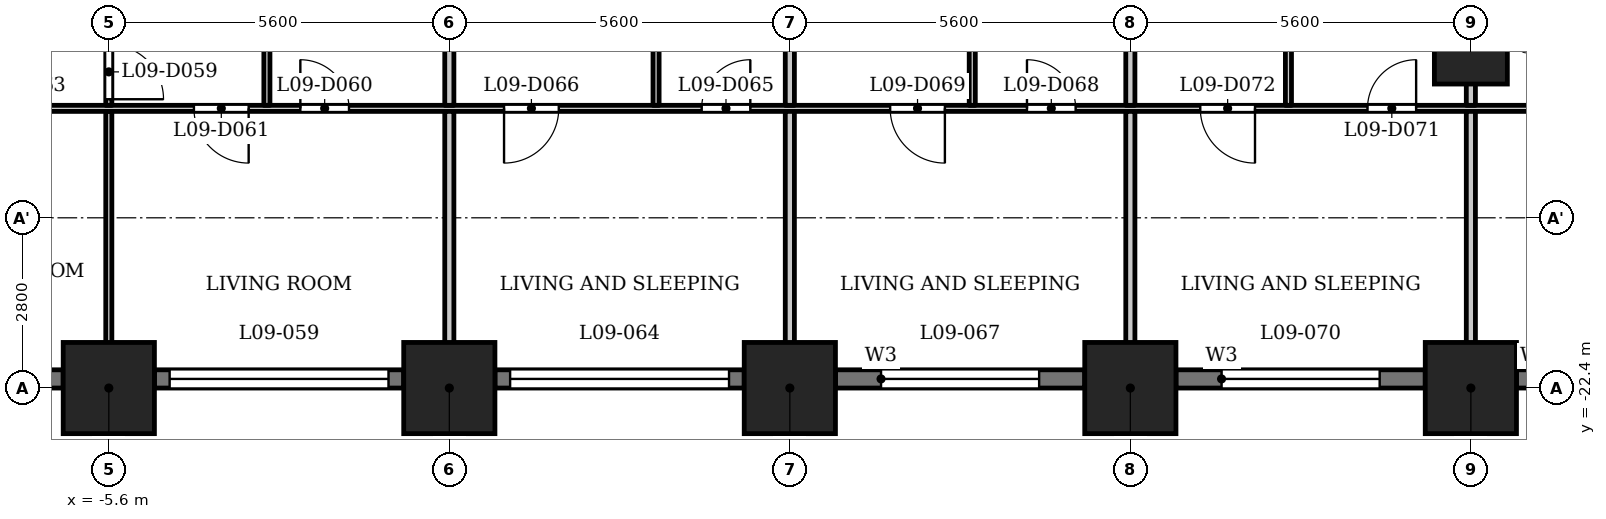
"""IFC4 building model, lengths in metres.
Left out: names, types, materials, properties, quantities, classifications, styles, units other than length and angle.
Written with IfcOpenShell. Run it as: python <this file> out.ifc"""

import sys

from ifc_helpers import new_model, si_unit, direction, frame, frame_2d, origin, origin_2d, place, context, subcontext, project, spatial, rectangle, extrude, element, fill, save


model = new_model("IFC4")
c1 = context("Model", 3, precision=1e-05, world=origin(), true_north=direction((0.0, 1.0)))
c2 = subcontext(c1, "Body", "Model", "MODEL_VIEW")
j1 = project(units=[si_unit("LENGTHUNIT", "METRE"), si_unit("PLANEANGLEUNIT", "RADIAN")], contexts=[c1])
p1 = place(None, origin())
s1 = spatial("IfcSite", under=j1, at=p1, CompositionType="ELEMENT")
p2 = place(p1, origin())
s2 = spatial("IfcBuilding", under=s1, at=p2, CompositionType="ELEMENT")
p3 = place(p2, frame((0.0, 0.0, 41.0)))
s3 = spatial("IfcBuildingStorey", under=s2, at=p3, CompositionType="ELEMENT", Elevation=41.0)
for number, where, z_axis, x_axis in (
    (1, (-5.6, -22.4, 0.0), (0.0, 0.0, 1.0), (1.0, 0.0, 0.0)),
    (2, (0.0, -22.4, 0.0), (0.0, 0.0, 1.0), (1.0, 0.0, 0.0)),
    (3, (5.6, -22.4, 0.0), (0.0, 0.0, 1.0), (1.0, 0.0, 0.0)),
    (4, (11.2, -22.4, 0.0), (0.0, 0.0, 1.0), (1.0, 0.0, 0.0)),
    (5, (16.8, -22.4, 0.0), (0.0, 0.0, 1.0), (1.0, 0.0, 0.0)),
):
    element("IfcColumn", number, at=place(p3, frame(where, z_axis=z_axis, x_axis=x_axis)), inside=s3, PredefinedType="COLUMN", context=c2, shape_type="SweptSolid", body=[
        extrude(rectangle(XDim=1.5, YDim=1.5, at=origin_2d()), origin(), (0.0, 0.0, 1.0), 3.5),
    ])
p4 = place(p3, frame((16.8, -16.8, 0.0), z_axis=(0.0, 0.0, 1.0), x_axis=(1.0, 0.0, 0.0)))
e6 = element("IfcColumn", 6, at=p4, inside=s3, PredefinedType="COLUMN", context=c2, shape_type="SweptSolid", body=[
    extrude(rectangle(XDim=1.2, YDim=1.2, at=origin_2d()), origin(), (0.0, 0.0, 1.0), 3.5),
])
p5 = place(p3, frame((-10.45, -22.25, 0.0), z_axis=(0.0, 0.0, 1.0), x_axis=(1.0, 0.0, 0.0)))
e7 = element("IfcWall", 7, at=p5, inside=s3, PredefinedType="SOLIDWALL", context=c2, shape_type="SweptSolid", body=[
    extrude(rectangle(XDim=4.1, YDim=0.3, at=frame_2d((2.05, 0.0))), origin(), (0.0, 0.0, 1.0), 2.35),
])
p6 = place(p5, frame((0.488, 0.0, 0.6)))
e8 = element("IfcOpeningElement", 8, at=p6, cuts=e7, PredefinedType="OPENING", context=c2, shape_type="SweptSolid", body=[
    extrude(rectangle(XDim=1.2, YDim=1.55, at=frame_2d((0.6, 0.775))), frame((0.0, 0.16, 0.0), z_axis=(0.0, -1.0, 0.0), x_axis=(1.0, 0.0, 0.0)), (0.0, 0.0, 1.0), 0.32),
])
p7 = place(p5, frame((2.613, 0.0, 0.6)))
e9 = element("IfcOpeningElement", 9, at=p7, cuts=e7, PredefinedType="OPENING", context=c2, shape_type="SweptSolid", body=[
    extrude(rectangle(XDim=1.2, YDim=1.55, at=frame_2d((0.6, 0.775))), frame((0.0, 0.16, 0.0), z_axis=(0.0, -1.0, 0.0), x_axis=(1.0, 0.0, 0.0)), (0.0, 0.0, 1.0), 0.32),
])
p8 = place(p3, frame((-4.85, -22.25, 0.0), z_axis=(0.0, 0.0, 1.0), x_axis=(1.0, 0.0, 0.0)))
e10 = element("IfcWall", 10, at=p8, inside=s3, PredefinedType="SOLIDWALL", context=c2, shape_type="SweptSolid", body=[
    extrude(rectangle(XDim=4.1, YDim=0.3, at=frame_2d((2.05, 0.0))), origin(), (0.0, 0.0, 1.0), 2.35),
])
p9 = place(p8, frame((0.25, 0.0, 1.2)))
e11 = element("IfcOpeningElement", 11, at=p9, cuts=e10, PredefinedType="OPENING", context=c2, shape_type="SweptSolid", body=[
    extrude(rectangle(XDim=3.6, YDim=0.95, at=frame_2d((1.8, 0.475))), frame((0.0, 0.16, 0.0), z_axis=(0.0, -1.0, 0.0), x_axis=(1.0, 0.0, 0.0)), (0.0, 0.0, 1.0), 0.32),
])
p10 = place(p3, frame((0.75, -22.25, 0.0), z_axis=(0.0, 0.0, 1.0), x_axis=(1.0, 0.0, 0.0)))
e12 = element("IfcWall", 12, at=p10, inside=s3, PredefinedType="SOLIDWALL", context=c2, shape_type="SweptSolid", body=[
    extrude(rectangle(XDim=4.1, YDim=0.3, at=frame_2d((2.05, 0.0))), origin(), (0.0, 0.0, 1.0), 2.35),
])
p11 = place(p10, frame((0.25, 0.0, 1.2)))
e13 = element("IfcOpeningElement", 13, at=p11, cuts=e12, PredefinedType="OPENING", context=c2, shape_type="SweptSolid", body=[
    extrude(rectangle(XDim=3.6, YDim=0.95, at=frame_2d((1.8, 0.475))), frame((0.0, 0.16, 0.0), z_axis=(0.0, -1.0, 0.0), x_axis=(1.0, 0.0, 0.0)), (0.0, 0.0, 1.0), 0.32),
])
p12 = place(p3, frame((6.35, -22.25, 0.0), z_axis=(0.0, 0.0, 1.0), x_axis=(1.0, 0.0, 0.0)))
e14 = element("IfcWall", 14, at=p12, inside=s3, PredefinedType="SOLIDWALL", context=c2, shape_type="SweptSolid", body=[
    extrude(rectangle(XDim=4.1, YDim=0.3, at=frame_2d((2.05, 0.0))), origin(), (0.0, 0.0, 1.0), 2.35),
])
p13 = place(p12, frame((0.75, 0.0, 0.9)))
e15 = element("IfcOpeningElement", 15, at=p13, cuts=e14, PredefinedType="OPENING", context=c2, shape_type="SweptSolid", body=[
    extrude(rectangle(XDim=2.6, YDim=1.25, at=frame_2d((1.3, 0.625))), frame((0.0, 0.16, 0.0), z_axis=(0.0, -1.0, 0.0), x_axis=(1.0, 0.0, 0.0)), (0.0, 0.0, 1.0), 0.32),
])
p14 = place(p3, frame((11.95, -22.25, 0.0), z_axis=(0.0, 0.0, 1.0), x_axis=(1.0, 0.0, 0.0)))
e16 = element("IfcWall", 16, at=p14, inside=s3, PredefinedType="SOLIDWALL", context=c2, shape_type="SweptSolid", body=[
    extrude(rectangle(XDim=4.1, YDim=0.3, at=frame_2d((2.05, 0.0))), origin(), (0.0, 0.0, 1.0), 2.35),
])
p15 = place(p14, frame((0.75, 0.0, 0.9)))
e17 = element("IfcOpeningElement", 17, at=p15, cuts=e16, PredefinedType="OPENING", context=c2, shape_type="SweptSolid", body=[
    extrude(rectangle(XDim=2.6, YDim=1.25, at=frame_2d((1.3, 0.625))), frame((0.0, 0.16, 0.0), z_axis=(0.0, -1.0, 0.0), x_axis=(1.0, 0.0, 0.0)), (0.0, 0.0, 1.0), 0.32),
])
p16 = place(p3, frame((17.55, -22.25, 0.0), z_axis=(0.0, 0.0, 1.0), x_axis=(1.0, 0.0, 0.0)))
e18 = element("IfcWall", 18, at=p16, inside=s3, PredefinedType="SOLIDWALL", context=c2, shape_type="SweptSolid", body=[
    extrude(rectangle(XDim=2.45, YDim=0.3, at=frame_2d((1.225, 0.0))), origin(), (0.0, 0.0, 1.0), 2.35),
])
p17 = place(p16, frame((0.325, 0.0, 0.9)))
e19 = element("IfcOpeningElement", 19, at=p17, cuts=e18, PredefinedType="OPENING", context=c2, shape_type="SweptSolid", body=[
    extrude(rectangle(XDim=1.8, YDim=1.25, at=frame_2d((0.9, 0.625))), frame((0.0, 0.16, 0.0), z_axis=(0.0, -1.0, 0.0), x_axis=(1.0, 0.0, 0.0)), (0.0, 0.0, 1.0), 0.32),
])
p18 = place(p3, frame((-26.394, -17.8, 0.0), z_axis=(0.0, 0.0, 1.0), x_axis=(1.0, 0.0, 0.0)))
e20 = element("IfcWall", 20, at=p18, inside=s3, PredefinedType="PARTITIONING", context=c2, shape_type="SweptSolid", body=[
    extrude(rectangle(XDim=53.126, YDim=0.1, at=frame_2d((26.563, 0.0))), origin(), (0.0, 0.0, 1.0), 3.2),
])
p19 = place(p18, frame((0.794, 0.0, 0.0)))
e21 = element("IfcOpeningElement", 21, at=p19, cuts=e20, PredefinedType="OPENING", context=c2, shape_type="SweptSolid", body=[
    extrude(rectangle(XDim=0.8, YDim=2.1, at=frame_2d((0.4, 1.05))), frame((0.0, 0.06, 0.0), z_axis=(0.0, -1.0, 0.0), x_axis=(1.0, 0.0, 0.0)), (0.0, 0.0, 1.0), 0.12),
])
p20 = place(p18, frame((5.644, 0.0, 0.0)))
e22 = element("IfcOpeningElement", 22, at=p20, cuts=e20, PredefinedType="OPENING", context=c2, shape_type="SweptSolid", body=[
    extrude(rectangle(XDim=0.9, YDim=2.1, at=frame_2d((0.45, 1.05))), frame((0.0, 0.06, 0.0), z_axis=(0.0, -1.0, 0.0), x_axis=(1.0, 0.0, 0.0)), (0.0, 0.0, 1.0), 0.12),
])
p21 = place(p18, frame((10.394, 0.0, 0.0)))
e23 = element("IfcOpeningElement", 23, at=p21, cuts=e20, PredefinedType="OPENING", context=c2, shape_type="SweptSolid", body=[
    extrude(rectangle(XDim=0.8, YDim=2.1, at=frame_2d((0.4, 1.05))), frame((0.0, 0.06, 0.0), z_axis=(0.0, -1.0, 0.0), x_axis=(1.0, 0.0, 0.0)), (0.0, 0.0, 1.0), 0.12),
])
p22 = place(p18, frame((13.244, 0.0, 0.0)))
e24 = element("IfcOpeningElement", 24, at=p22, cuts=e20, PredefinedType="OPENING", context=c2, shape_type="SweptSolid", body=[
    extrude(rectangle(XDim=0.9, YDim=2.1, at=frame_2d((0.45, 1.05))), frame((0.0, 0.06, 0.0), z_axis=(0.0, -1.0, 0.0), x_axis=(1.0, 0.0, 0.0)), (0.0, 0.0, 1.0), 0.12),
])
p23 = place(p18, frame((23.944, 0.0, 0.0)))
e25 = element("IfcOpeningElement", 25, at=p23, cuts=e20, PredefinedType="OPENING", context=c2, shape_type="SweptSolid", body=[
    extrude(rectangle(XDim=0.8, YDim=2.1, at=frame_2d((0.4, 1.05))), frame((0.0, 0.06, 0.0), z_axis=(0.0, -1.0, 0.0), x_axis=(1.0, 0.0, 0.0)), (0.0, 0.0, 1.0), 0.12),
])
p24 = place(p18, frame((22.194, 0.0, 0.0)))
e26 = element("IfcOpeningElement", 26, at=p24, cuts=e20, PredefinedType="OPENING", context=c2, shape_type="SweptSolid", body=[
    extrude(rectangle(XDim=0.9, YDim=2.1, at=frame_2d((0.45, 1.05))), frame((0.0, 0.06, 0.0), z_axis=(0.0, -1.0, 0.0), x_axis=(1.0, 0.0, 0.0)), (0.0, 0.0, 1.0), 0.12),
])
p25 = place(p18, frame((16.594, 0.0, 0.0)))
e27 = element("IfcOpeningElement", 27, at=p25, cuts=e20, PredefinedType="OPENING", context=c2, shape_type="SweptSolid", body=[
    extrude(rectangle(XDim=0.9, YDim=2.1, at=frame_2d((0.45, 1.05))), frame((0.0, 0.06, 0.0), z_axis=(0.0, -1.0, 0.0), x_axis=(1.0, 0.0, 0.0)), (0.0, 0.0, 1.0), 0.12),
])
p26 = place(p18, frame((18.844, 0.0, 0.0)))
e28 = element("IfcOpeningElement", 28, at=p26, cuts=e20, PredefinedType="OPENING", context=c2, shape_type="SweptSolid", body=[
    extrude(rectangle(XDim=0.9, YDim=2.1, at=frame_2d((0.45, 1.05))), frame((0.0, 0.06, 0.0), z_axis=(0.0, -1.0, 0.0), x_axis=(1.0, 0.0, 0.0)), (0.0, 0.0, 1.0), 0.12),
])
p27 = place(p18, frame((30.544, 0.0, 0.0)))
e29 = element("IfcOpeningElement", 29, at=p27, cuts=e20, PredefinedType="OPENING", context=c2, shape_type="SweptSolid", body=[
    extrude(rectangle(XDim=0.8, YDim=2.1, at=frame_2d((0.4, 1.05))), frame((0.0, 0.06, 0.0), z_axis=(0.0, -1.0, 0.0), x_axis=(1.0, 0.0, 0.0)), (0.0, 0.0, 1.0), 0.12),
])
p28 = place(p18, frame((27.294, 0.0, 0.0)))
e30 = element("IfcOpeningElement", 30, at=p28, cuts=e20, PredefinedType="OPENING", context=c2, shape_type="SweptSolid", body=[
    extrude(rectangle(XDim=0.9, YDim=2.1, at=frame_2d((0.45, 1.05))), frame((0.0, 0.06, 0.0), z_axis=(0.0, -1.0, 0.0), x_axis=(1.0, 0.0, 0.0)), (0.0, 0.0, 1.0), 0.12),
])
p29 = place(p18, frame((35.894, 0.0, 0.0)))
e31 = element("IfcOpeningElement", 31, at=p29, cuts=e20, PredefinedType="OPENING", context=c2, shape_type="SweptSolid", body=[
    extrude(rectangle(XDim=0.8, YDim=2.1, at=frame_2d((0.4, 1.05))), frame((0.0, 0.06, 0.0), z_axis=(0.0, -1.0, 0.0), x_axis=(1.0, 0.0, 0.0)), (0.0, 0.0, 1.0), 0.12),
])
p30 = place(p18, frame((33.644, 0.0, 0.0)))
e32 = element("IfcOpeningElement", 32, at=p30, cuts=e20, PredefinedType="OPENING", context=c2, shape_type="SweptSolid", body=[
    extrude(rectangle(XDim=0.9, YDim=2.1, at=frame_2d((0.45, 1.05))), frame((0.0, 0.06, 0.0), z_axis=(0.0, -1.0, 0.0), x_axis=(1.0, 0.0, 0.0)), (0.0, 0.0, 1.0), 0.12),
])
p31 = place(p18, frame((41.494, 0.0, 0.0)))
e33 = element("IfcOpeningElement", 33, at=p31, cuts=e20, PredefinedType="OPENING", context=c2, shape_type="SweptSolid", body=[
    extrude(rectangle(XDim=0.8, YDim=2.1, at=frame_2d((0.4, 1.05))), frame((0.0, 0.06, 0.0), z_axis=(0.0, -1.0, 0.0), x_axis=(1.0, 0.0, 0.0)), (0.0, 0.0, 1.0), 0.12),
])
p32 = place(p18, frame((38.744, 0.0, 0.0)))
e34 = element("IfcOpeningElement", 34, at=p32, cuts=e20, PredefinedType="OPENING", context=c2, shape_type="SweptSolid", body=[
    extrude(rectangle(XDim=0.9, YDim=2.1, at=frame_2d((0.45, 1.05))), frame((0.0, 0.06, 0.0), z_axis=(0.0, -1.0, 0.0), x_axis=(1.0, 0.0, 0.0)), (0.0, 0.0, 1.0), 0.12),
])
p33 = place(p18, frame((49.362, 0.0, 0.0)))
e35 = element("IfcOpeningElement", 35, at=p33, cuts=e20, PredefinedType="OPENING", context=c2, shape_type="SweptSolid", body=[
    extrude(rectangle(XDim=0.8, YDim=2.1, at=frame_2d((0.4, 1.05))), frame((0.0, 0.06, 0.0), z_axis=(0.0, -1.0, 0.0), x_axis=(1.0, 0.0, 0.0)), (0.0, 0.0, 1.0), 0.12),
])
p34 = place(p18, frame((45.094, 0.0, 0.0)))
e36 = element("IfcOpeningElement", 36, at=p34, cuts=e20, PredefinedType="OPENING", context=c2, shape_type="SweptSolid", body=[
    extrude(rectangle(XDim=0.9, YDim=2.1, at=frame_2d((0.45, 1.05))), frame((0.0, 0.06, 0.0), z_axis=(0.0, -1.0, 0.0), x_axis=(1.0, 0.0, 0.0)), (0.0, 0.0, 1.0), 0.12),
])
p35 = place(p3, frame((-5.6, -23.13, 0.0), z_axis=(0.0, 0.0, 1.0), x_axis=(0.0, 1.0, 0.0)))
e37 = element("IfcWall", 37, at=p35, inside=s3, PredefinedType="PARTITIONING", context=c2, shape_type="SweptSolid", body=[
    extrude(rectangle(XDim=5.28, YDim=0.1, at=frame_2d((2.64, 0.0))), origin(), (0.0, 0.0, 1.0), 3.2),
])
p36 = place(p3, frame((-5.6, -17.75, 0.0), z_axis=(0.0, 0.0, 1.0), x_axis=(0.0, 1.0, 0.0)))
e38 = element("IfcWall", 38, at=p36, inside=s3, PredefinedType="PARTITIONING", context=c2, shape_type="SweptSolid", body=[
    extrude(rectangle(XDim=2.275, YDim=0.1, at=frame_2d((1.137, 0.0))), origin(), (0.0, 0.0, 1.0), 3.2),
])
p37 = place(p36, frame((0.1, 0.0, 0.0)))
e39 = element("IfcOpeningElement", 39, at=p37, cuts=e38, PredefinedType="OPENING", context=c2, shape_type="SweptSolid", body=[
    extrude(rectangle(XDim=0.9, YDim=2.1, at=frame_2d((0.45, 1.05))), frame((0.0, 0.06, 0.0), z_axis=(0.0, -1.0, 0.0), x_axis=(1.0, 0.0, 0.0)), (0.0, 0.0, 1.0), 0.12),
])
p38 = place(p3, frame((-3.0, -17.75, 0.0), z_axis=(0.0, 0.0, 1.0), x_axis=(0.0, 1.0, 0.0)))
e40 = element("IfcWall", 40, at=p38, inside=s3, PredefinedType="PARTITIONING", context=c2, shape_type="SweptSolid", body=[
    extrude(rectangle(XDim=2.275, YDim=0.1, at=frame_2d((1.137, 0.0))), origin(), (0.0, 0.0, 1.0), 3.2),
])
p39 = place(p3, frame((0.0, -23.13, 0.0), z_axis=(0.0, 0.0, 1.0), x_axis=(0.0, 1.0, 0.0)))
e41 = element("IfcWall", 41, at=p39, inside=s3, PredefinedType="PARTITIONING", context=c2, shape_type="SweptSolid", body=[
    extrude(rectangle(XDim=5.28, YDim=0.15, at=frame_2d((2.64, 0.0))), origin(), (0.0, 0.0, 1.0), 3.2),
])
p40 = place(p3, frame((0.0, -17.75, 0.0), z_axis=(0.0, 0.0, 1.0), x_axis=(0.0, 1.0, 0.0)))
e42 = element("IfcWall", 42, at=p40, inside=s3, PredefinedType="PARTITIONING", context=c2, shape_type="SweptSolid", body=[
    extrude(rectangle(XDim=2.275, YDim=0.15, at=frame_2d((1.137, 0.0))), origin(), (0.0, 0.0, 1.0), 3.2),
])
p41 = place(p3, frame((3.4, -17.75, 0.0), z_axis=(0.0, 0.0, 1.0), x_axis=(0.0, 1.0, 0.0)))
e43 = element("IfcWall", 43, at=p41, inside=s3, PredefinedType="PARTITIONING", context=c2, shape_type="SweptSolid", body=[
    extrude(rectangle(XDim=2.275, YDim=0.1, at=frame_2d((1.137, 0.0))), origin(), (0.0, 0.0, 1.0), 3.2),
])
p42 = place(p3, frame((5.6, -23.13, 0.0), z_axis=(0.0, 0.0, 1.0), x_axis=(0.0, 1.0, 0.0)))
e44 = element("IfcWall", 44, at=p42, inside=s3, PredefinedType="PARTITIONING", context=c2, shape_type="SweptSolid", body=[
    extrude(rectangle(XDim=5.28, YDim=0.15, at=frame_2d((2.64, 0.0))), origin(), (0.0, 0.0, 1.0), 3.2),
])
p43 = place(p3, frame((5.6, -17.75, 0.0), z_axis=(0.0, 0.0, 1.0), x_axis=(0.0, 1.0, 0.0)))
e45 = element("IfcWall", 45, at=p43, inside=s3, PredefinedType="PARTITIONING", context=c2, shape_type="SweptSolid", body=[
    extrude(rectangle(XDim=2.275, YDim=0.15, at=frame_2d((1.137, 0.0))), origin(), (0.0, 0.0, 1.0), 3.2),
])
p44 = place(p3, frame((8.6, -17.75, 0.0), z_axis=(0.0, 0.0, 1.0), x_axis=(0.0, 1.0, 0.0)))
e46 = element("IfcWall", 46, at=p44, inside=s3, PredefinedType="PARTITIONING", context=c2, shape_type="SweptSolid", body=[
    extrude(rectangle(XDim=2.275, YDim=0.1, at=frame_2d((1.137, 0.0))), origin(), (0.0, 0.0, 1.0), 3.2),
])
p45 = place(p3, frame((11.2, -23.13, 0.0), z_axis=(0.0, 0.0, 1.0), x_axis=(0.0, 1.0, 0.0)))
e47 = element("IfcWall", 47, at=p45, inside=s3, PredefinedType="PARTITIONING", context=c2, shape_type="SweptSolid", body=[
    extrude(rectangle(XDim=5.28, YDim=0.15, at=frame_2d((2.64, 0.0))), origin(), (0.0, 0.0, 1.0), 3.2),
])
p46 = place(p3, frame((11.2, -17.75, 0.0), z_axis=(0.0, 0.0, 1.0), x_axis=(0.0, 1.0, 0.0)))
e48 = element("IfcWall", 48, at=p46, inside=s3, PredefinedType="PARTITIONING", context=c2, shape_type="SweptSolid", body=[
    extrude(rectangle(XDim=2.275, YDim=0.15, at=frame_2d((1.137, 0.0))), origin(), (0.0, 0.0, 1.0), 3.2),
])
p47 = place(p3, frame((13.8, -17.75, 0.0), z_axis=(0.0, 0.0, 1.0), x_axis=(0.0, 1.0, 0.0)))
e49 = element("IfcWall", 49, at=p47, inside=s3, PredefinedType="PARTITIONING", context=c2, shape_type="SweptSolid", body=[
    extrude(rectangle(XDim=2.275, YDim=0.1, at=frame_2d((1.137, 0.0))), origin(), (0.0, 0.0, 1.0), 3.2),
])
p48 = place(p3, frame((16.8, -23.13, 0.0), z_axis=(0.0, 0.0, 1.0), x_axis=(0.0, 1.0, 0.0)))
e50 = element("IfcWall", 50, at=p48, inside=s3, PredefinedType="PARTITIONING", context=c2, shape_type="SweptSolid", body=[
    extrude(rectangle(XDim=5.28, YDim=0.15, at=frame_2d((2.64, 0.0))), origin(), (0.0, 0.0, 1.0), 3.2),
])
p49 = place(p3, frame((16.8, -17.75, 0.0), z_axis=(0.0, 0.0, 1.0), x_axis=(0.0, 1.0, 0.0)))
e51 = element("IfcWall", 51, at=p49, inside=s3, PredefinedType="PARTITIONING", context=c2, shape_type="SweptSolid", body=[
    extrude(rectangle(XDim=2.275, YDim=0.15, at=frame_2d((1.137, 0.0))), origin(), (0.0, 0.0, 1.0), 3.2),
])
p50 = place(p37, origin())
e52 = element("IfcDoor", 52, at=p50, inside=s3, OperationType="SINGLE_SWING_LEFT", PredefinedType="DOOR", context=c2, shape_type="SweptSolid", body=[
    extrude(rectangle(XDim=0.9, YDim=2.1, at=frame_2d((0.45, 1.05))), frame((0.0, 0.025, 0.0), z_axis=(0.0, -1.0, 0.0), x_axis=(1.0, 0.0, 0.0)), (0.0, 0.0, 1.0), 0.05),
])
fill(e39, e52)
p51 = place(p23, origin())
e53 = element("IfcDoor", 53, at=p51, inside=s3, OperationType="SINGLE_SWING_RIGHT", PredefinedType="DOOR", context=c2, shape_type="SweptSolid", body=[
    extrude(rectangle(XDim=0.8, YDim=2.1, at=frame_2d((0.4, 1.05))), frame((0.0, 0.025, 0.0), z_axis=(0.0, -1.0, 0.0), x_axis=(1.0, 0.0, 0.0)), (0.0, 0.0, 1.0), 0.05),
])
fill(e25, e53)
p52 = place(p24, origin())
e54 = element("IfcDoor", 54, at=p52, inside=s3, OperationType="SINGLE_SWING_RIGHT", PredefinedType="DOOR", context=c2, shape_type="SweptSolid", body=[
    extrude(rectangle(XDim=0.9, YDim=2.1, at=frame_2d((0.45, 1.05))), frame((0.0, 0.025, 0.0), z_axis=(0.0, -1.0, 0.0), x_axis=(1.0, 0.0, 0.0)), (0.0, 0.0, 1.0), 0.05),
])
fill(e26, e54)
p53 = place(p27, origin())
e55 = element("IfcDoor", 55, at=p53, inside=s3, OperationType="SINGLE_SWING_LEFT", PredefinedType="DOOR", context=c2, shape_type="SweptSolid", body=[
    extrude(rectangle(XDim=0.8, YDim=2.1, at=frame_2d((0.4, 1.05))), frame((0.0, 0.025, 0.0), z_axis=(0.0, -1.0, 0.0), x_axis=(1.0, 0.0, 0.0)), (0.0, 0.0, 1.0), 0.05),
])
fill(e29, e55)
p54 = place(p28, origin())
e56 = element("IfcDoor", 56, at=p54, inside=s3, OperationType="SINGLE_SWING_LEFT", PredefinedType="DOOR", context=c2, shape_type="SweptSolid", body=[
    extrude(rectangle(XDim=0.9, YDim=2.1, at=frame_2d((0.45, 1.05))), frame((0.0, 0.025, 0.0), z_axis=(0.0, -1.0, 0.0), x_axis=(1.0, 0.0, 0.0)), (0.0, 0.0, 1.0), 0.05),
])
fill(e30, e56)
p55 = place(p29, origin())
e57 = element("IfcDoor", 57, at=p55, inside=s3, OperationType="SINGLE_SWING_RIGHT", PredefinedType="DOOR", context=c2, shape_type="SweptSolid", body=[
    extrude(rectangle(XDim=0.8, YDim=2.1, at=frame_2d((0.4, 1.05))), frame((0.0, 0.025, 0.0), z_axis=(0.0, -1.0, 0.0), x_axis=(1.0, 0.0, 0.0)), (0.0, 0.0, 1.0), 0.05),
])
fill(e31, e57)
p56 = place(p30, origin())
e58 = element("IfcDoor", 58, at=p56, inside=s3, OperationType="SINGLE_SWING_RIGHT", PredefinedType="DOOR", context=c2, shape_type="SweptSolid", body=[
    extrude(rectangle(XDim=0.9, YDim=2.1, at=frame_2d((0.45, 1.05))), frame((0.0, 0.025, 0.0), z_axis=(0.0, -1.0, 0.0), x_axis=(1.0, 0.0, 0.0)), (0.0, 0.0, 1.0), 0.05),
])
fill(e32, e58)
p57 = place(p31, origin())
e59 = element("IfcDoor", 59, at=p57, inside=s3, OperationType="SINGLE_SWING_LEFT", PredefinedType="DOOR", context=c2, shape_type="SweptSolid", body=[
    extrude(rectangle(XDim=0.8, YDim=2.1, at=frame_2d((0.4, 1.05))), frame((0.0, 0.025, 0.0), z_axis=(0.0, -1.0, 0.0), x_axis=(1.0, 0.0, 0.0)), (0.0, 0.0, 1.0), 0.05),
])
fill(e33, e59)
p58 = place(p32, origin())
e60 = element("IfcDoor", 60, at=p58, inside=s3, OperationType="SINGLE_SWING_RIGHT", PredefinedType="DOOR", context=c2, shape_type="SweptSolid", body=[
    extrude(rectangle(XDim=0.9, YDim=2.1, at=frame_2d((0.45, 1.05))), frame((0.0, 0.025, 0.0), z_axis=(0.0, -1.0, 0.0), x_axis=(1.0, 0.0, 0.0)), (0.0, 0.0, 1.0), 0.05),
])
fill(e34, e60)
p59 = place(p9, origin())
e61 = element("IfcWindow", 61, at=p59, inside=s3, PartitioningType="SINGLE_PANEL", PredefinedType="WINDOW", context=c2, shape_type="SweptSolid", body=[
    extrude(rectangle(XDim=3.6, YDim=0.95, at=frame_2d((1.8, 0.475))), frame((0.0, 0.03, 0.0), z_axis=(0.0, -1.0, 0.0), x_axis=(1.0, 0.0, 0.0)), (0.0, 0.0, 1.0), 0.06),
])
fill(e11, e61)
p60 = place(p11, origin())
e62 = element("IfcWindow", 62, at=p60, inside=s3, PartitioningType="SINGLE_PANEL", PredefinedType="WINDOW", context=c2, shape_type="SweptSolid", body=[
    extrude(rectangle(XDim=3.6, YDim=0.95, at=frame_2d((1.8, 0.475))), frame((0.0, 0.03, 0.0), z_axis=(0.0, -1.0, 0.0), x_axis=(1.0, 0.0, 0.0)), (0.0, 0.0, 1.0), 0.06),
])
fill(e13, e62)
p61 = place(p13, origin())
e63 = element("IfcWindow", 63, at=p61, inside=s3, PartitioningType="SINGLE_PANEL", PredefinedType="WINDOW", context=c2, shape_type="SweptSolid", body=[
    extrude(rectangle(XDim=2.6, YDim=1.25, at=frame_2d((1.3, 0.625))), frame((0.0, 0.03, 0.0), z_axis=(0.0, -1.0, 0.0), x_axis=(1.0, 0.0, 0.0)), (0.0, 0.0, 1.0), 0.06),
])
fill(e15, e63)
p62 = place(p15, origin())
e64 = element("IfcWindow", 64, at=p62, inside=s3, PartitioningType="SINGLE_PANEL", PredefinedType="WINDOW", context=c2, shape_type="SweptSolid", body=[
    extrude(rectangle(XDim=2.6, YDim=1.25, at=frame_2d((1.3, 0.625))), frame((0.0, 0.03, 0.0), z_axis=(0.0, -1.0, 0.0), x_axis=(1.0, 0.0, 0.0)), (0.0, 0.0, 1.0), 0.06),
])
fill(e17, e64)
save(model, sys.argv[1])
